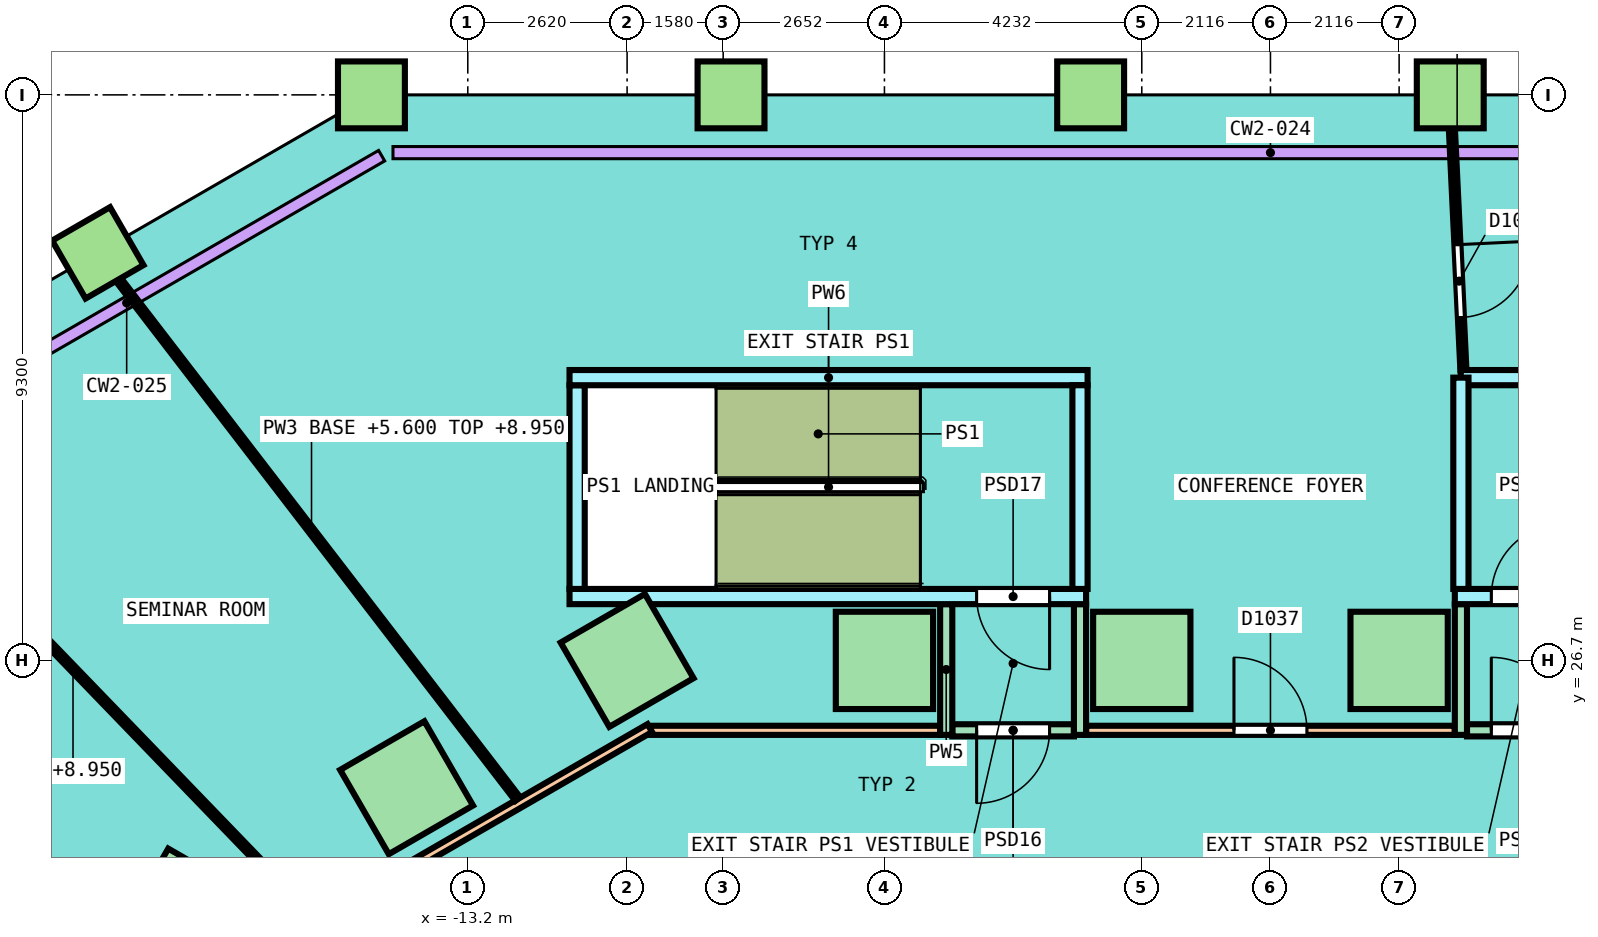
"""IFC4 building model, lengths in metres.
Left out: names, types, materials, properties, quantities, classifications, styles, units other than length and angle.
Written with IfcOpenShell. Run it as: python <this file> out.ifc"""

import sys

from ifc_helpers import new_model, si_unit, direction, frame, frame_2d, origin, origin_2d, place, context, subcontext, project, spatial, rectangle, extrude, element, fill, save


model = new_model("IFC4")
c1 = context("Model", 3, precision=1e-05, world=origin(), true_north=direction((0.0, 1.0)))
c2 = subcontext(c1, "Body", "Model", "MODEL_VIEW")
j1 = project(units=[si_unit("LENGTHUNIT", "METRE"), si_unit("PLANEANGLEUNIT", "RADIAN")], contexts=[c1])
p1 = place(None, origin())
s1 = spatial("IfcSite", under=j1, at=p1, CompositionType="ELEMENT")
p2 = place(p1, origin())
s2 = spatial("IfcBuilding", under=s1, at=p2, CompositionType="ELEMENT")
p3 = place(p2, frame((0.0, 0.0, 5.6)))
s3 = spatial("IfcBuildingStorey", under=s2, at=p3, CompositionType="ELEMENT", Elevation=5.6)
for number, where, z_axis, x_axis in (
    (1, (2.116, 26.7, 0.0), (0.0, 0.0, 1.0), (-1.0, 0.0, 0.0)),
    (2, (-2.116, 26.7, 0.0), (0.0, 0.0, 1.0), (-1.0, 0.0, 0.0)),
    (3, (-6.348, 26.7, 0.0), (0.0, 0.0, 1.0), (-1.0, 0.0, 0.0)),
    (4, (-10.58, 26.7, 0.0), (0.0, 0.0, 1.0), (-0.866, -0.5, 0.0)),
    (5, (-14.206, 24.606, 0.0), (0.0, 0.0, 1.0), (-0.866, -0.5, 0.0)),
    (6, (-17.833, 22.512, 0.0), (0.0, 0.0, 1.0), (-0.5, -0.866, 0.0)),
):
    element("IfcColumn", number, at=place(p3, frame(where, z_axis=z_axis, x_axis=x_axis)), inside=s3, PredefinedType="COLUMN", context=c2, shape_type="SweptSolid", body=[
        extrude(rectangle(XDim=1.6, YDim=1.6, at=origin_2d()), origin(), (0.0, 0.0, 1.0), 4.25),
    ])
for number, where, z_axis, x_axis in (
    (7, (2.957, 36.0, 0.0), (0.0, 0.0, 1.0), (-1.0, 0.0, 0.0)),
    (8, (-2.957, 36.0, 0.0), (0.0, 0.0, 1.0), (-1.0, 0.0, 0.0)),
    (9, (-8.871, 36.0, 0.0), (0.0, 0.0, 1.0), (-1.0, 0.0, 0.0)),
    (10, (-14.785, 36.0, 0.0), (0.0, 0.0, 1.0), (-1.0, 0.0, 0.0)),
    (11, (-19.285, 33.402, 0.0), (0.0, 0.0, 1.0), (-0.866, -0.5, 0.0)),
):
    element("IfcColumn", number, at=place(p3, frame(where, z_axis=z_axis, x_axis=x_axis)), inside=s3, PredefinedType="COLUMN", context=c2, shape_type="SweptSolid", body=[
        extrude(rectangle(XDim=1.1, YDim=1.1, at=origin_2d()), origin(), (0.0, 0.0, 1.0), 4.25),
    ])
p4 = place(p3, frame((-10.197, 25.55, 0.0), z_axis=(0.0, 0.0, 1.0), x_axis=(1.0, 0.0, 0.0)))
e12 = element("IfcWall", 12, at=p4, inside=s3, PredefinedType="PARTITIONING", context=c2, shape_type="SweptSolid", body=[
    extrude(rectangle(XDim=4.765, YDim=0.15, at=frame_2d((2.382, 0.0))), origin(), (0.0, 0.0, 1.0), 3.2),
])
p5 = place(p3, frame((-3.032, 25.55, 0.0), z_axis=(0.0, 0.0, 1.0), x_axis=(1.0, 0.0, 0.0)))
e13 = element("IfcWall", 13, at=p5, inside=s3, PredefinedType="PARTITIONING", context=c2, shape_type="SweptSolid", body=[
    extrude(rectangle(XDim=6.064, YDim=0.15, at=frame_2d((3.032, 0.0))), origin(), (0.0, 0.0, 1.0), 3.2),
])
p6 = place(p5, frame((2.432, 0.0, 0.0)))
e14 = element("IfcOpeningElement", 14, at=p6, cuts=e13, PredefinedType="OPENING", context=c2, shape_type="SweptSolid", body=[
    extrude(rectangle(XDim=1.2, YDim=2.1, at=frame_2d((0.6, 1.05))), frame((0.0, 0.085, 0.0), z_axis=(0.0, -1.0, 0.0), x_axis=(1.0, 0.0, 0.0)), (0.0, 0.0, 1.0), 0.17),
])
p7 = place(p3, frame((-16.926, 21.708, 0.0), z_axis=(0.0, 0.0, 1.0), x_axis=(0.866023143435, 0.50000391502, 0.0)))
e15 = element("IfcWall", 15, at=p7, inside=s3, PredefinedType="PARTITIONING", context=c2, shape_type="SweptSolid", body=[
    extrude(rectangle(XDim=7.759, YDim=0.15, at=frame_2d((3.879, 0.0))), origin(), (0.0, 0.0, 1.0), 3.2),
])
p8 = place(p7, frame((2.117, 0.0, 0.0)))
e16 = element("IfcOpeningElement", 16, at=p8, cuts=e15, PredefinedType="OPENING", context=c2, shape_type="SweptSolid", body=[
    extrude(rectangle(XDim=0.9, YDim=2.1, at=frame_2d((0.45, 1.05))), frame((0.0, 0.085, 0.0), z_axis=(0.0, -1.0, 0.0), x_axis=(1.0, 0.0, 0.0)), (0.0, 0.0, 1.0), 0.17),
])
p9 = place(p3, frame((-5.232, 25.55, 0.0), z_axis=(0.0, 0.0, 1.0), x_axis=(1.0, 0.0, 0.0)))
e17 = element("IfcWall", 17, at=p9, inside=s3, PredefinedType="PARTITIONING", context=c2, shape_type="SweptSolid", body=[
    extrude(rectangle(XDim=2.0, YDim=0.2, at=frame_2d((1.0, 0.0))), origin(), (0.0, 0.0, 1.0), 4.25),
])
p10 = place(p9, frame((0.4, 0.0, 0.0)))
e18 = element("IfcOpeningElement", 18, at=p10, cuts=e17, PredefinedType="OPENING", context=c2, shape_type="SweptSolid", body=[
    extrude(rectangle(XDim=1.2, YDim=2.1, at=frame_2d((0.6, 1.05))), frame((0.0, 0.11, 0.0), z_axis=(0.0, -1.0, 0.0), x_axis=(1.0, 0.0, 0.0)), (0.0, 0.0, 1.0), 0.22),
])
p11 = place(p3, frame((3.232, 25.55, 0.0), z_axis=(0.0, 0.0, 1.0), x_axis=(1.0, 0.0, 0.0)))
e19 = element("IfcWall", 19, at=p11, inside=s3, PredefinedType="PARTITIONING", context=c2, shape_type="SweptSolid", body=[
    extrude(rectangle(XDim=2.0, YDim=0.2, at=frame_2d((1.0, 0.0))), origin(), (0.0, 0.0, 1.0), 4.25),
])
p12 = place(p11, frame((0.4, 0.0, 0.0)))
e20 = element("IfcOpeningElement", 20, at=p12, cuts=e19, PredefinedType="OPENING", context=c2, shape_type="SweptSolid", body=[
    extrude(rectangle(XDim=1.2, YDim=2.1, at=frame_2d((0.6, 1.05))), frame((0.0, 0.11, 0.0), z_axis=(0.0, -1.0, 0.0), x_axis=(1.0, 0.0, 0.0)), (0.0, 0.0, 1.0), 0.22),
])
for number, where, z_axis, x_axis in (
    (21, (-5.332, 25.475, 0.0), (0.0, 0.0, 1.0), (0.0, 1.0, 0.0)),
    (22, (-3.132, 25.475, 0.0), (0.0, 0.0, 1.0), (0.0, 1.0, 0.0)),
    (23, (3.132, 25.475, 0.0), (0.0, 0.0, 1.0), (0.0, 1.0, 0.0)),
):
    element("IfcWall", number, at=place(p3, frame(where, z_axis=z_axis, x_axis=x_axis)), inside=s3, PredefinedType="PARTITIONING", context=c2, shape_type="SweptSolid", body=[
        extrude(rectangle(XDim=2.15, YDim=0.2, at=frame_2d((1.075, 0.0))), origin(), (0.0, 0.0, 1.0), 3.35),
    ])
p13 = place(p3, frame((2.967, 35.8, 0.0), z_axis=(0.0, 0.0, 1.0), x_axis=(0.047755341285, -0.998859062821, 0.0)))
e24 = element("IfcWall", 24, at=p13, inside=s3, PredefinedType="PARTITIONING", context=c2, shape_type="SweptSolid", body=[
    extrude(rectangle(XDim=4.33, YDim=0.1, at=frame_2d((2.165, 0.0))), origin(), (0.0, 0.0, 1.0), 4.25),
])
p14 = place(p13, frame((2.266, 0.0, 0.0)))
e25 = element("IfcOpeningElement", 25, at=p14, cuts=e24, PredefinedType="OPENING", context=c2, shape_type="SweptSolid", body=[
    extrude(rectangle(XDim=1.2, YDim=2.1, at=frame_2d((0.6, 1.05))), frame((0.0, 0.06, 0.0), z_axis=(0.0, -1.0, 0.0), x_axis=(1.0, 0.0, 0.0)), (0.0, 0.0, 1.0), 0.12),
])
p15 = place(p3, frame((-19.162, 33.242, 0.0), z_axis=(0.0, 0.0, 1.0), x_axis=(0.609546416877, -0.79275038043, 0.0)))
e26 = element("IfcWall", 26, at=p15, inside=s3, PredefinedType="PARTITIONING", context=c2, shape_type="SweptSolid", body=[
    extrude(rectangle(XDim=11.129, YDim=0.1, at=frame_2d((5.564, 0.0))), origin(), (0.0, 0.0, 1.0), 3.35),
])
p16 = place(p3, frame((-23.64, 30.654, 0.0), z_axis=(0.0, 0.0, 1.0), x_axis=(0.694530893364, -0.719462881713, 0.0)))
e27 = element("IfcWall", 27, at=p16, inside=s3, PredefinedType="PARTITIONING", context=c2, shape_type="SweptSolid", body=[
    extrude(rectangle(XDim=11.369, YDim=0.1, at=frame_2d((5.685, 0.0))), origin(), (0.0, 0.0, 1.0), 3.35),
])
p17 = place(p3, frame((-11.527, 27.75, 0.0), z_axis=(0.0, 0.0, 1.0), x_axis=(1.0, 0.0, 0.0)))
e28 = element("IfcWall", 28, at=p17, inside=s3, PredefinedType="SOLIDWALL", context=c2, shape_type="SweptSolid", body=[
    extrude(rectangle(XDim=8.495, YDim=0.25, at=frame_2d((4.248, 0.0))), origin(), (0.0, 0.0, 1.0), 4.25),
])
p18 = place(p17, frame((6.695, 0.0, 0.0)))
e29 = element("IfcOpeningElement", 29, at=p18, cuts=e28, PredefinedType="OPENING", context=c2, shape_type="SweptSolid", body=[
    extrude(rectangle(XDim=1.2, YDim=2.1, at=frame_2d((0.6, 1.05))), frame((0.0, 0.135, 0.0), z_axis=(0.0, -1.0, 0.0), x_axis=(1.0, 0.0, 0.0)), (0.0, 0.0, 1.0), 0.27),
])
p19 = place(p3, frame((3.032, 27.75, 0.0), z_axis=(0.0, 0.0, 1.0), x_axis=(1.0, 0.0, 0.0)))
e30 = element("IfcWall", 30, at=p19, inside=s3, PredefinedType="SOLIDWALL", context=c2, shape_type="SweptSolid", body=[
    extrude(rectangle(XDim=8.495, YDim=0.25, at=frame_2d((4.248, 0.0))), origin(), (0.0, 0.0, 1.0), 4.25),
])
p20 = place(p19, frame((0.6, 0.0, 0.0)))
e31 = element("IfcOpeningElement", 31, at=p20, cuts=e30, PredefinedType="OPENING", context=c2, shape_type="SweptSolid", body=[
    extrude(rectangle(XDim=1.2, YDim=2.1, at=frame_2d((0.6, 1.05))), frame((0.0, 0.135, 0.0), z_axis=(0.0, -1.0, 0.0), x_axis=(1.0, 0.0, 0.0)), (0.0, 0.0, 1.0), 0.27),
])
p21 = place(p3, frame((-11.402, 27.875, 0.0), z_axis=(0.0, 0.0, 1.0), x_axis=(0.0, 1.0, 0.0)))
e32 = element("IfcWall", 32, at=p21, inside=s3, PredefinedType="SOLIDWALL", context=c2, shape_type="SweptSolid", body=[
    extrude(rectangle(XDim=3.35, YDim=0.25, at=frame_2d((1.675, 0.0))), origin(), (0.0, 0.0, 1.0), 4.25),
])
p22 = place(p3, frame((-11.527, 31.35, 0.0), z_axis=(0.0, 0.0, 1.0), x_axis=(1.0, 0.0, 0.0)))
e33 = element("IfcWall", 33, at=p22, inside=s3, PredefinedType="SOLIDWALL", context=c2, shape_type="SweptSolid", body=[
    extrude(rectangle(XDim=8.52, YDim=0.25, at=frame_2d((4.26, 0.0))), origin(), (0.0, 0.0, 1.0), 4.25),
])
p23 = place(p3, frame((3.129, 31.35, 0.0), z_axis=(0.0, 0.0, 1.0), x_axis=(1.0, 0.0, 0.0)))
e34 = element("IfcWall", 34, at=p23, inside=s3, PredefinedType="SOLIDWALL", context=c2, shape_type="SweptSolid", body=[
    extrude(rectangle(XDim=8.397, YDim=0.25, at=frame_2d((4.199, 0.0))), origin(), (0.0, 0.0, 1.0), 4.25),
])
p24 = place(p3, frame((-3.132, 27.875, 0.0), z_axis=(0.0, 0.0, 1.0), x_axis=(0.0, 1.0, 0.0)))
e35 = element("IfcWall", 35, at=p24, inside=s3, PredefinedType="SOLIDWALL", context=c2, shape_type="SweptSolid", body=[
    extrude(rectangle(XDim=3.35, YDim=0.25, at=frame_2d((1.675, 0.0))), origin(), (0.0, 0.0, 1.0), 4.25),
])
p25 = place(p3, frame((3.132, 27.875, 0.0), z_axis=(0.0, 0.0, 1.0), x_axis=(0.0, 1.0, 0.0)))
e36 = element("IfcWall", 36, at=p25, inside=s3, PredefinedType="SOLIDWALL", context=c2, shape_type="SweptSolid", body=[
    extrude(rectangle(XDim=3.475, YDim=0.25, at=frame_2d((1.738, 0.0))), origin(), (0.0, 0.0, 1.0), 4.25),
])
p26 = place(p14, origin())
e37 = element("IfcDoor", 37, at=p26, inside=s3, OperationType="DOUBLE_DOOR_SINGLE_SWING", PredefinedType="DOOR", context=c2, shape_type="SweptSolid", body=[
    extrude(rectangle(XDim=1.2, YDim=2.1, at=frame_2d((0.6, 1.05))), frame((0.0, 0.025, 0.0), z_axis=(0.0, -1.0, 0.0), x_axis=(1.0, 0.0, 0.0)), (0.0, 0.0, 1.0), 0.05),
])
fill(e25, e37)
p27 = place(p6, origin())
e38 = element("IfcDoor", 38, at=p27, inside=s3, OperationType="DOUBLE_DOOR_SINGLE_SWING", PredefinedType="DOOR", context=c2, shape_type="SweptSolid", body=[
    extrude(rectangle(XDim=1.2, YDim=2.1, at=frame_2d((0.6, 1.05))), frame((0.0, 0.025, 0.0), z_axis=(0.0, -1.0, 0.0), x_axis=(1.0, 0.0, 0.0)), (0.0, 0.0, 1.0), 0.05),
])
fill(e14, e38)
p28 = place(p10, origin())
e39 = element("IfcDoor", 39, at=p28, inside=s3, OperationType="SINGLE_SWING_LEFT", PredefinedType="DOOR", context=c2, shape_type="SweptSolid", body=[
    extrude(rectangle(XDim=1.2, YDim=2.1, at=frame_2d((0.6, 1.05))), frame((0.0, 0.025, 0.0), z_axis=(0.0, -1.0, 0.0), x_axis=(1.0, 0.0, 0.0)), (0.0, 0.0, 1.0), 0.05),
])
fill(e18, e39)
p29 = place(p18, origin())
e40 = element("IfcDoor", 40, at=p29, inside=s3, OperationType="SINGLE_SWING_RIGHT", PredefinedType="DOOR", context=c2, shape_type="SweptSolid", body=[
    extrude(rectangle(XDim=1.2, YDim=2.1, at=frame_2d((0.6, 1.05))), frame((0.0, 0.025, 0.0), z_axis=(0.0, -1.0, 0.0), x_axis=(1.0, 0.0, 0.0)), (0.0, 0.0, 1.0), 0.05),
])
fill(e29, e40)
p30 = place(p12, origin())
e41 = element("IfcDoor", 41, at=p30, inside=s3, OperationType="SINGLE_SWING_LEFT", PredefinedType="DOOR", context=c2, shape_type="SweptSolid", body=[
    extrude(rectangle(XDim=1.2, YDim=2.1, at=frame_2d((0.6, 1.05))), frame((0.0, 0.025, 0.0), z_axis=(0.0, -1.0, 0.0), x_axis=(1.0, 0.0, 0.0)), (0.0, 0.0, 1.0), 0.05),
])
fill(e20, e41)
p31 = place(p20, origin())
e42 = element("IfcDoor", 42, at=p31, inside=s3, OperationType="SINGLE_SWING_RIGHT", PredefinedType="DOOR", context=c2, shape_type="SweptSolid", body=[
    extrude(rectangle(XDim=1.2, YDim=2.1, at=frame_2d((0.6, 1.05))), frame((0.0, 0.025, 0.0), z_axis=(0.0, -1.0, 0.0), x_axis=(1.0, 0.0, 0.0)), (0.0, 0.0, 1.0), 0.05),
])
fill(e31, e42)
save(model, sys.argv[1])
